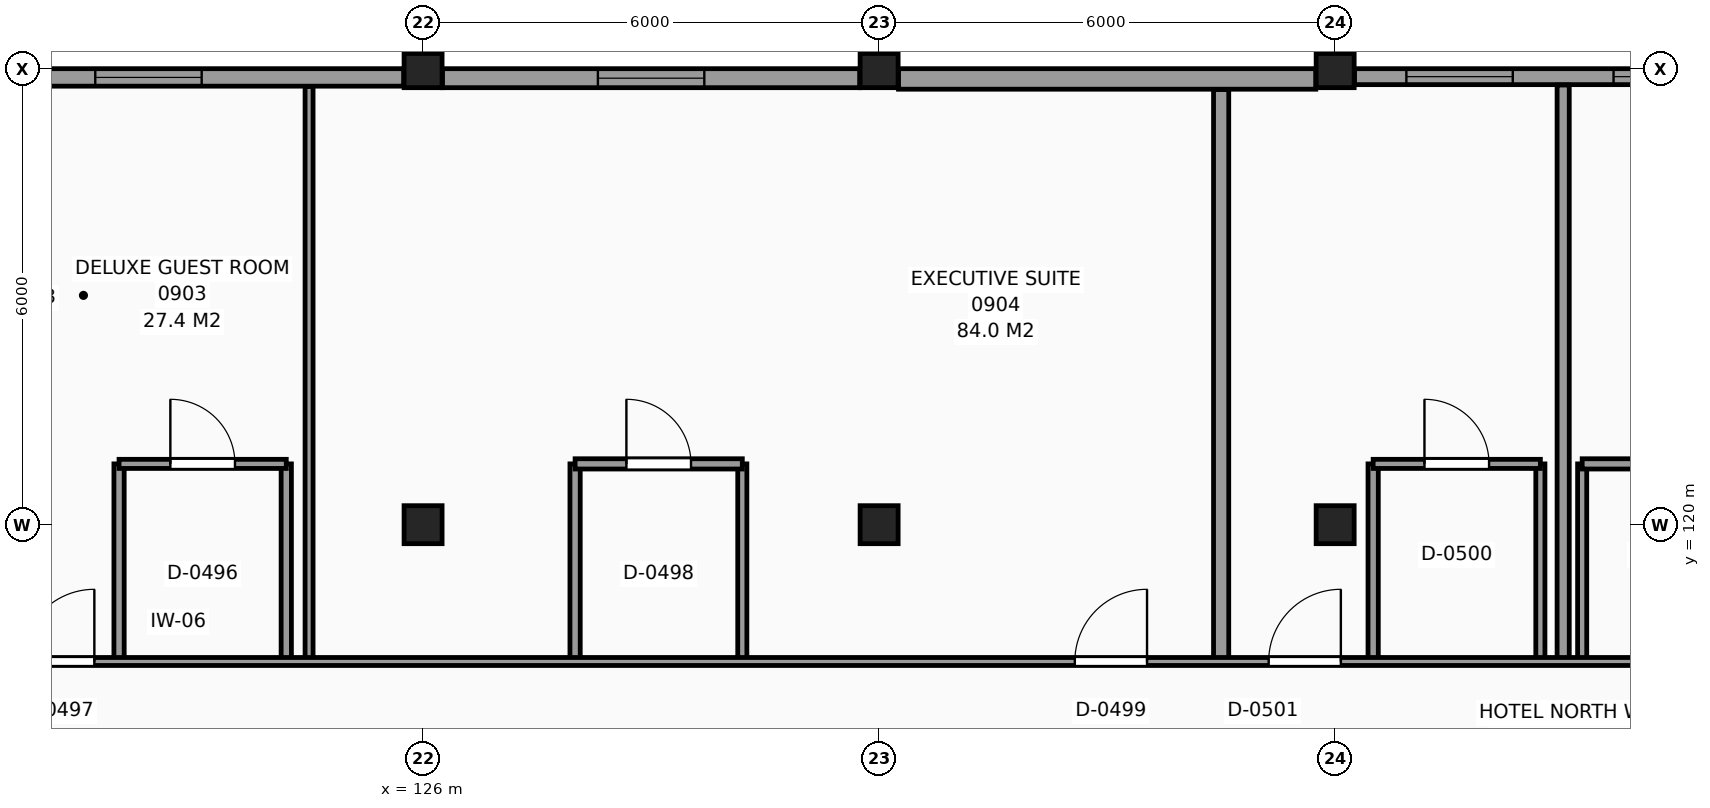
"""IFC4 building model, lengths in metres.
Left out: names, types, materials, properties, quantities, classifications, styles, units other than length and angle.
Written with IfcOpenShell. Run it as: python <this file> out.ifc"""

import sys

from ifc_helpers import new_model, si_unit, direction, frame, frame_2d, origin, origin_2d, place, context, subcontext, project, spatial, rectangle, extrude, element, fill, save


model = new_model("IFC4")
c1 = context("Model", 3, precision=1e-05, world=origin(), true_north=direction((0.0, 1.0)))
c2 = subcontext(c1, "Body", "Model", "MODEL_VIEW")
j1 = project(units=[si_unit("LENGTHUNIT", "METRE"), si_unit("PLANEANGLEUNIT", "RADIAN")], contexts=[c1])
p1 = place(None, origin())
s1 = spatial("IfcSite", under=j1, at=p1, CompositionType="ELEMENT")
p2 = place(p1, origin())
s2 = spatial("IfcBuilding", under=s1, at=p2, CompositionType="ELEMENT")
p3 = place(p2, frame((0.0, 0.0, 38.1)))
s3 = spatial("IfcBuildingStorey", under=s2, at=p3, CompositionType="ELEMENT", Elevation=38.1)
for number, where, z_axis, x_axis in (
    (1, (126.0, 120.0, 0.0), (0.0, 0.0, 1.0), (1.0, 0.0, 0.0)),
    (2, (126.0, 126.0, 0.0), (0.0, 0.0, 1.0), (1.0, 0.0, 0.0)),
    (3, (132.0, 120.0, 0.0), (0.0, 0.0, 1.0), (1.0, 0.0, 0.0)),
    (4, (132.0, 126.0, 0.0), (0.0, 0.0, 1.0), (1.0, 0.0, 0.0)),
    (5, (138.0, 120.0, 0.0), (0.0, 0.0, 1.0), (1.0, 0.0, 0.0)),
    (6, (138.0, 126.0, 0.0), (0.0, 0.0, 1.0), (1.0, 0.0, 0.0)),
):
    element("IfcColumn", number, at=place(p3, frame(where, z_axis=z_axis, x_axis=x_axis)), inside=s3, PredefinedType="COLUMN", context=c2, shape_type="SweptSolid", body=[
        extrude(rectangle(XDim=0.5, YDim=0.5, at=origin_2d()), origin(), (0.0, 0.0, 1.0), 3.3),
    ])
p4 = place(p3, frame((143.745, 125.895, 0.0), z_axis=(0.0, 0.0, 1.0), x_axis=(-1.0, 0.0, 0.0)))
e7 = element("IfcWall", 7, at=p4, inside=s3, PredefinedType="SOLIDWALL", context=c2, shape_type="SweptSolid", body=[
    extrude(rectangle(XDim=5.49, YDim=0.21, at=frame_2d((2.745, 0.0))), origin(), (0.0, 0.0, 1.0), 2.41),
])
p5 = place(p4, frame((3.408, 0.0, 0.8)))
e8 = element("IfcOpeningElement", 8, at=p5, cuts=e7, PredefinedType="OPENING", context=c2, shape_type="SweptSolid", body=[
    extrude(rectangle(XDim=1.4, YDim=1.4, at=frame_2d((0.7, 0.7))), frame((0.0, 0.115, 0.0), z_axis=(0.0, -1.0, 0.0), x_axis=(1.0, 0.0, 0.0)), (0.0, 0.0, 1.0), 0.23),
])
p6 = place(p4, frame((0.682, 0.0, 0.8)))
e9 = element("IfcOpeningElement", 9, at=p6, cuts=e7, PredefinedType="OPENING", context=c2, shape_type="SweptSolid", body=[
    extrude(rectangle(XDim=1.4, YDim=1.4, at=frame_2d((0.7, 0.7))), frame((0.0, 0.115, 0.0), z_axis=(0.0, -1.0, 0.0), x_axis=(1.0, 0.0, 0.0)), (0.0, 0.0, 1.0), 0.23),
])
p7 = place(p3, frame((137.745, 125.865, 0.0), z_axis=(0.0, 0.0, 1.0), x_axis=(-1.0, 0.0, 0.0)))
e10 = element("IfcWall", 10, at=p7, inside=s3, PredefinedType="SOLIDWALL", context=c2, shape_type="SweptSolid", body=[
    extrude(rectangle(XDim=5.49, YDim=0.27, at=frame_2d((2.745, 0.0))), origin(), (0.0, 0.0, 1.0), 2.41),
])
p8 = place(p3, frame((131.745, 125.875, 0.0), z_axis=(0.0, 0.0, 1.0), x_axis=(-1.0, 0.0, 0.0)))
e11 = element("IfcWall", 11, at=p8, inside=s3, PredefinedType="SOLIDWALL", context=c2, shape_type="SweptSolid", body=[
    extrude(rectangle(XDim=5.49, YDim=0.25, at=frame_2d((2.745, 0.0))), origin(), (0.0, 0.0, 1.0), 2.41),
])
p9 = place(p8, frame((2.045, 0.0, 0.8)))
e12 = element("IfcOpeningElement", 12, at=p9, cuts=e11, PredefinedType="OPENING", context=c2, shape_type="SweptSolid", body=[
    extrude(rectangle(XDim=1.4, YDim=1.4, at=frame_2d((0.7, 0.7))), frame((0.0, 0.135, 0.0), z_axis=(0.0, -1.0, 0.0), x_axis=(1.0, 0.0, 0.0)), (0.0, 0.0, 1.0), 0.27),
])
p10 = place(p3, frame((125.745, 125.885, 0.0), z_axis=(0.0, 0.0, 1.0), x_axis=(-1.0, 0.0, 0.0)))
e13 = element("IfcWall", 13, at=p10, inside=s3, PredefinedType="SOLIDWALL", context=c2, shape_type="SweptSolid", body=[
    extrude(rectangle(XDim=5.49, YDim=0.23, at=frame_2d((2.745, 0.0))), origin(), (0.0, 0.0, 1.0), 2.41),
])
p11 = place(p10, frame((2.658, 0.0, 0.8)))
e14 = element("IfcOpeningElement", 14, at=p11, cuts=e13, PredefinedType="OPENING", context=c2, shape_type="SweptSolid", body=[
    extrude(rectangle(XDim=1.4, YDim=1.4, at=frame_2d((0.7, 0.7))), frame((0.0, 0.125, 0.0), z_axis=(0.0, -1.0, 0.0), x_axis=(1.0, 0.0, 0.0)), (0.0, 0.0, 1.0), 0.25),
])
for number, where, z_axis, x_axis in (
    (15, (122.0, 118.2, 0.0), (0.0, 0.0, 1.0), (0.0, 1.0, 0.0)),
    (16, (124.2, 118.2, 0.0), (0.0, 0.0, 1.0), (0.0, 1.0, 0.0)),
):
    element("IfcWall", number, at=place(p3, frame(where, z_axis=z_axis, x_axis=x_axis)), inside=s3, PredefinedType="PARTITIONING", context=c2, shape_type="SweptSolid", body=[
        extrude(rectangle(XDim=2.6, YDim=0.135, at=frame_2d((1.3, 0.0))), origin(), (0.0, 0.0, 1.0), 3.06),
    ])
p12 = place(p3, frame((124.5, 118.2, 0.0), z_axis=(0.0, 0.0, 1.0), x_axis=(0.0, 1.0, 0.0)))
e17 = element("IfcWall", 17, at=p12, inside=s3, PredefinedType="PARTITIONING", context=c2, shape_type="SweptSolid", body=[
    extrude(rectangle(XDim=7.565, YDim=0.105, at=frame_2d((3.782, 0.0))), origin(), (0.0, 0.0, 1.0), 3.06),
])
p13 = place(p3, frame((128.0, 118.2, 0.0), z_axis=(0.0, 0.0, 1.0), x_axis=(0.0, 1.0, 0.0)))
e18 = element("IfcWall", 18, at=p13, inside=s3, PredefinedType="PARTITIONING", context=c2, shape_type="SweptSolid", body=[
    extrude(rectangle(XDim=2.6, YDim=0.135, at=frame_2d((1.3, 0.0))), origin(), (0.0, 0.0, 1.0), 3.06),
])
p14 = place(p3, frame((130.2, 118.2, 0.0), z_axis=(0.0, 0.0, 1.0), x_axis=(0.0, 1.0, 0.0)))
e19 = element("IfcWall", 19, at=p14, inside=s3, PredefinedType="PARTITIONING", context=c2, shape_type="SweptSolid", body=[
    extrude(rectangle(XDim=2.6, YDim=0.12, at=frame_2d((1.3, 0.0))), origin(), (0.0, 0.0, 1.0), 3.06),
])
p15 = place(p3, frame((136.5, 118.2, 0.0), z_axis=(0.0, 0.0, 1.0), x_axis=(0.0, 1.0, 0.0)))
e20 = element("IfcWall", 20, at=p15, inside=s3, PredefinedType="PARTITIONING", context=c2, shape_type="SweptSolid", body=[
    extrude(rectangle(XDim=7.525, YDim=0.2, at=frame_2d((3.763, 0.0))), origin(), (0.0, 0.0, 1.0), 3.06),
])
p16 = place(p3, frame((138.5, 118.2, 0.0), z_axis=(0.0, 0.0, 1.0), x_axis=(0.0, 1.0, 0.0)))
e21 = element("IfcWall", 21, at=p16, inside=s3, PredefinedType="PARTITIONING", context=c2, shape_type="SweptSolid", body=[
    extrude(rectangle(XDim=2.6, YDim=0.135, at=frame_2d((1.3, 0.0))), origin(), (0.0, 0.0, 1.0), 3.06),
])
p17 = place(p3, frame((140.7, 118.2, 0.0), z_axis=(0.0, 0.0, 1.0), x_axis=(0.0, 1.0, 0.0)))
e22 = element("IfcWall", 22, at=p17, inside=s3, PredefinedType="PARTITIONING", context=c2, shape_type="SweptSolid", body=[
    extrude(rectangle(XDim=2.6, YDim=0.12, at=frame_2d((1.3, 0.0))), origin(), (0.0, 0.0, 1.0), 3.06),
])
p18 = place(p3, frame((141.0, 118.2, 0.0), z_axis=(0.0, 0.0, 1.0), x_axis=(0.0, 1.0, 0.0)))
e23 = element("IfcWall", 23, at=p18, inside=s3, PredefinedType="PARTITIONING", context=c2, shape_type="SweptSolid", body=[
    extrude(rectangle(XDim=7.585, YDim=0.16, at=frame_2d((3.792, 0.0))), origin(), (0.0, 0.0, 1.0), 3.06),
])
p19 = place(p3, frame((141.25, 118.2, 0.0), z_axis=(0.0, 0.0, 1.0), x_axis=(0.0, 1.0, 0.0)))
e24 = element("IfcWall", 24, at=p19, inside=s3, PredefinedType="PARTITIONING", context=c2, shape_type="SweptSolid", body=[
    extrude(rectangle(XDim=2.6, YDim=0.12, at=frame_2d((1.3, 0.0))), origin(), (0.0, 0.0, 1.0), 3.06),
])
p20 = place(p3, frame((102.215, 118.2, 0.0), z_axis=(0.0, 0.0, 1.0), x_axis=(1.0, 0.0, 0.0)))
e25 = element("IfcWall", 25, at=p20, inside=s3, PredefinedType="PARTITIONING", context=c2, shape_type="SweptSolid", body=[
    extrude(rectangle(XDim=74.285, YDim=0.105, at=frame_2d((37.143, 0.0))), origin(), (0.0, 0.0, 1.0), 3.06),
])
p21 = place(p20, frame((2.36, 0.0, 0.0)))
e26 = element("IfcOpeningElement", 26, at=p21, cuts=e25, PredefinedType="OPENING", context=c2, shape_type="SweptSolid", body=[
    extrude(rectangle(XDim=0.95, YDim=2.1, at=frame_2d((0.475, 1.05))), frame((0.0, 0.062, 0.0), z_axis=(0.0, -1.0, 0.0), x_axis=(1.0, 0.0, 0.0)), (0.0, 0.0, 1.0), 0.125),
])
p22 = place(p20, frame((9.41, 0.0, 0.0)))
e27 = element("IfcOpeningElement", 27, at=p22, cuts=e25, PredefinedType="OPENING", context=c2, shape_type="SweptSolid", body=[
    extrude(rectangle(XDim=0.95, YDim=2.1, at=frame_2d((0.475, 1.05))), frame((0.0, 0.062, 0.0), z_axis=(0.0, -1.0, 0.0), x_axis=(1.0, 0.0, 0.0)), (0.0, 0.0, 1.0), 0.125),
])
p23 = place(p20, frame((18.51, 0.0, 0.0)))
e28 = element("IfcOpeningElement", 28, at=p23, cuts=e25, PredefinedType="OPENING", context=c2, shape_type="SweptSolid", body=[
    extrude(rectangle(XDim=0.95, YDim=2.1, at=frame_2d((0.475, 1.05))), frame((0.0, 0.062, 0.0), z_axis=(0.0, -1.0, 0.0), x_axis=(1.0, 0.0, 0.0)), (0.0, 0.0, 1.0), 0.125),
])
p24 = place(p20, frame((32.36, 0.0, 0.0)))
e29 = element("IfcOpeningElement", 29, at=p24, cuts=e25, PredefinedType="OPENING", context=c2, shape_type="SweptSolid", body=[
    extrude(rectangle(XDim=0.95, YDim=2.1, at=frame_2d((0.475, 1.05))), frame((0.0, 0.062, 0.0), z_axis=(0.0, -1.0, 0.0), x_axis=(1.0, 0.0, 0.0)), (0.0, 0.0, 1.0), 0.125),
])
p25 = place(p20, frame((34.91, 0.0, 0.0)))
e30 = element("IfcOpeningElement", 30, at=p25, cuts=e25, PredefinedType="OPENING", context=c2, shape_type="SweptSolid", body=[
    extrude(rectangle(XDim=0.95, YDim=2.1, at=frame_2d((0.475, 1.05))), frame((0.0, 0.062, 0.0), z_axis=(0.0, -1.0, 0.0), x_axis=(1.0, 0.0, 0.0)), (0.0, 0.0, 1.0), 0.125),
])
p26 = place(p20, frame((42.11, 0.0, 0.0)))
e31 = element("IfcOpeningElement", 31, at=p26, cuts=e25, PredefinedType="OPENING", context=c2, shape_type="SweptSolid", body=[
    extrude(rectangle(XDim=0.95, YDim=2.1, at=frame_2d((0.475, 1.05))), frame((0.0, 0.062, 0.0), z_axis=(0.0, -1.0, 0.0), x_axis=(1.0, 0.0, 0.0)), (0.0, 0.0, 1.0), 0.125),
])
p27 = place(p20, frame((50.36, 0.0, 0.0)))
e32 = element("IfcOpeningElement", 32, at=p27, cuts=e25, PredefinedType="OPENING", context=c2, shape_type="SweptSolid", body=[
    extrude(rectangle(XDim=0.95, YDim=2.1, at=frame_2d((0.475, 1.05))), frame((0.0, 0.062, 0.0), z_axis=(0.0, -1.0, 0.0), x_axis=(1.0, 0.0, 0.0)), (0.0, 0.0, 1.0), 0.125),
])
p28 = place(p20, frame((52.91, 0.0, 0.0)))
e33 = element("IfcOpeningElement", 33, at=p28, cuts=e25, PredefinedType="OPENING", context=c2, shape_type="SweptSolid", body=[
    extrude(rectangle(XDim=0.95, YDim=2.1, at=frame_2d((0.475, 1.05))), frame((0.0, 0.062, 0.0), z_axis=(0.0, -1.0, 0.0), x_axis=(1.0, 0.0, 0.0)), (0.0, 0.0, 1.0), 0.125),
])
p29 = place(p20, frame((60.11, 0.0, 0.0)))
e34 = element("IfcOpeningElement", 34, at=p29, cuts=e25, PredefinedType="OPENING", context=c2, shape_type="SweptSolid", body=[
    extrude(rectangle(XDim=0.95, YDim=2.1, at=frame_2d((0.475, 1.05))), frame((0.0, 0.062, 0.0), z_axis=(0.0, -1.0, 0.0), x_axis=(1.0, 0.0, 0.0)), (0.0, 0.0, 1.0), 0.125),
])
p30 = place(p20, frame((64.31, 0.0, 0.0)))
e35 = element("IfcOpeningElement", 35, at=p30, cuts=e25, PredefinedType="OPENING", context=c2, shape_type="SweptSolid", body=[
    extrude(rectangle(XDim=0.95, YDim=2.1, at=frame_2d((0.475, 1.05))), frame((0.0, 0.062, 0.0), z_axis=(0.0, -1.0, 0.0), x_axis=(1.0, 0.0, 0.0)), (0.0, 0.0, 1.0), 0.125),
])
p31 = place(p20, frame((68.26, 0.0, 0.0)))
e36 = element("IfcOpeningElement", 36, at=p31, cuts=e25, PredefinedType="OPENING", context=c2, shape_type="SweptSolid", body=[
    extrude(rectangle(XDim=0.95, YDim=2.1, at=frame_2d((0.475, 1.05))), frame((0.0, 0.062, 0.0), z_axis=(0.0, -1.0, 0.0), x_axis=(1.0, 0.0, 0.0)), (0.0, 0.0, 1.0), 0.125),
])
p32 = place(p3, frame((122.0, 120.8, 0.0), z_axis=(0.0, 0.0, 1.0), x_axis=(1.0, 0.0, 0.0)))
e37 = element("IfcWall", 37, at=p32, inside=s3, PredefinedType="PARTITIONING", context=c2, shape_type="SweptSolid", body=[
    extrude(rectangle(XDim=2.2, YDim=0.12, at=frame_2d((1.1, 0.0))), origin(), (0.0, 0.0, 1.0), 3.06),
])
p33 = place(p32, frame((0.675, 0.0, 0.0)))
e38 = element("IfcOpeningElement", 38, at=p33, cuts=e37, PredefinedType="OPENING", context=c2, shape_type="SweptSolid", body=[
    extrude(rectangle(XDim=0.85, YDim=2.1, at=frame_2d((0.425, 1.05))), frame((0.0, 0.07, 0.0), z_axis=(0.0, -1.0, 0.0), x_axis=(1.0, 0.0, 0.0)), (0.0, 0.0, 1.0), 0.14),
])
p34 = place(p3, frame((128.0, 120.8, 0.0), z_axis=(0.0, 0.0, 1.0), x_axis=(1.0, 0.0, 0.0)))
e39 = element("IfcWall", 39, at=p34, inside=s3, PredefinedType="PARTITIONING", context=c2, shape_type="SweptSolid", body=[
    extrude(rectangle(XDim=2.2, YDim=0.135, at=frame_2d((1.1, 0.0))), origin(), (0.0, 0.0, 1.0), 3.06),
])
p35 = place(p34, frame((0.675, 0.0, 0.0)))
e40 = element("IfcOpeningElement", 40, at=p35, cuts=e39, PredefinedType="OPENING", context=c2, shape_type="SweptSolid", body=[
    extrude(rectangle(XDim=0.85, YDim=2.1, at=frame_2d((0.425, 1.05))), frame((0.0, 0.078, 0.0), z_axis=(0.0, -1.0, 0.0), x_axis=(1.0, 0.0, 0.0)), (0.0, 0.0, 1.0), 0.155),
])
p36 = place(p3, frame((138.5, 120.8, 0.0), z_axis=(0.0, 0.0, 1.0), x_axis=(1.0, 0.0, 0.0)))
e41 = element("IfcWall", 41, at=p36, inside=s3, PredefinedType="PARTITIONING", context=c2, shape_type="SweptSolid", body=[
    extrude(rectangle(XDim=2.2, YDim=0.12, at=frame_2d((1.1, 0.0))), origin(), (0.0, 0.0, 1.0), 3.06),
])
p37 = place(p36, frame((0.675, 0.0, 0.0)))
e42 = element("IfcOpeningElement", 42, at=p37, cuts=e41, PredefinedType="OPENING", context=c2, shape_type="SweptSolid", body=[
    extrude(rectangle(XDim=0.85, YDim=2.1, at=frame_2d((0.425, 1.05))), frame((0.0, 0.07, 0.0), z_axis=(0.0, -1.0, 0.0), x_axis=(1.0, 0.0, 0.0)), (0.0, 0.0, 1.0), 0.14),
])
p38 = place(p3, frame((141.25, 120.8, 0.0), z_axis=(0.0, 0.0, 1.0), x_axis=(1.0, 0.0, 0.0)))
e43 = element("IfcWall", 43, at=p38, inside=s3, PredefinedType="PARTITIONING", context=c2, shape_type="SweptSolid", body=[
    extrude(rectangle(XDim=2.2, YDim=0.135, at=frame_2d((1.1, 0.0))), origin(), (0.0, 0.0, 1.0), 3.06),
])
p39 = place(p38, frame((0.675, 0.0, 0.0)))
e44 = element("IfcOpeningElement", 44, at=p39, cuts=e43, PredefinedType="OPENING", context=c2, shape_type="SweptSolid", body=[
    extrude(rectangle(XDim=0.85, YDim=2.1, at=frame_2d((0.425, 1.05))), frame((0.0, 0.078, 0.0), z_axis=(0.0, -1.0, 0.0), x_axis=(1.0, 0.0, 0.0)), (0.0, 0.0, 1.0), 0.155),
])
p40 = place(p11, origin())
e45 = element("IfcWindow", 45, at=p40, inside=s3, PartitioningType="SINGLE_PANEL", PredefinedType="WINDOW", context=c2, shape_type="SweptSolid", body=[
    extrude(rectangle(XDim=1.4, YDim=1.4, at=frame_2d((0.7, 0.7))), frame((0.0, 0.03, 0.0), z_axis=(0.0, -1.0, 0.0), x_axis=(1.0, 0.0, 0.0)), (0.0, 0.0, 1.0), 0.06),
])
fill(e14, e45)
p41 = place(p9, origin())
e46 = element("IfcWindow", 46, at=p41, inside=s3, PartitioningType="SINGLE_PANEL", PredefinedType="WINDOW", context=c2, shape_type="SweptSolid", body=[
    extrude(rectangle(XDim=1.4, YDim=1.4, at=frame_2d((0.7, 0.7))), frame((0.0, 0.03, 0.0), z_axis=(0.0, -1.0, 0.0), x_axis=(1.0, 0.0, 0.0)), (0.0, 0.0, 1.0), 0.06),
])
fill(e12, e46)
p42 = place(p5, origin())
e47 = element("IfcWindow", 47, at=p42, inside=s3, PartitioningType="SINGLE_PANEL", PredefinedType="WINDOW", context=c2, shape_type="SweptSolid", body=[
    extrude(rectangle(XDim=1.4, YDim=1.4, at=frame_2d((0.7, 0.7))), frame((0.0, 0.03, 0.0), z_axis=(0.0, -1.0, 0.0), x_axis=(1.0, 0.0, 0.0)), (0.0, 0.0, 1.0), 0.06),
])
fill(e8, e47)
p43 = place(p6, origin())
e48 = element("IfcWindow", 48, at=p43, inside=s3, PartitioningType="SINGLE_PANEL", PredefinedType="WINDOW", context=c2, shape_type="SweptSolid", body=[
    extrude(rectangle(XDim=1.4, YDim=1.4, at=frame_2d((0.7, 0.7))), frame((0.0, 0.03, 0.0), z_axis=(0.0, -1.0, 0.0), x_axis=(1.0, 0.0, 0.0)), (0.0, 0.0, 1.0), 0.06),
])
fill(e9, e48)
p44 = place(p33, origin())
e49 = element("IfcDoor", 49, at=p44, inside=s3, OperationType="SINGLE_SWING_LEFT", PredefinedType="DOOR", context=c2, shape_type="SweptSolid", body=[
    extrude(rectangle(XDim=0.85, YDim=2.1, at=frame_2d((0.425, 1.05))), frame((0.0, 0.025, 0.0), z_axis=(0.0, -1.0, 0.0), x_axis=(1.0, 0.0, 0.0)), (0.0, 0.0, 1.0), 0.05),
])
fill(e38, e49)
p45 = place(p23, origin())
e50 = element("IfcDoor", 50, at=p45, inside=s3, OperationType="SINGLE_SWING_RIGHT", PredefinedType="DOOR", context=c2, shape_type="SweptSolid", body=[
    extrude(rectangle(XDim=0.95, YDim=2.1, at=frame_2d((0.475, 1.05))), frame((0.0, 0.025, 0.0), z_axis=(0.0, -1.0, 0.0), x_axis=(1.0, 0.0, 0.0)), (0.0, 0.0, 1.0), 0.05),
])
fill(e28, e50)
p46 = place(p35, origin())
e51 = element("IfcDoor", 51, at=p46, inside=s3, OperationType="SINGLE_SWING_LEFT", PredefinedType="DOOR", context=c2, shape_type="SweptSolid", body=[
    extrude(rectangle(XDim=0.85, YDim=2.1, at=frame_2d((0.425, 1.05))), frame((0.0, 0.025, 0.0), z_axis=(0.0, -1.0, 0.0), x_axis=(1.0, 0.0, 0.0)), (0.0, 0.0, 1.0), 0.05),
])
fill(e40, e51)
p47 = place(p24, origin())
e52 = element("IfcDoor", 52, at=p47, inside=s3, OperationType="SINGLE_SWING_RIGHT", PredefinedType="DOOR", context=c2, shape_type="SweptSolid", body=[
    extrude(rectangle(XDim=0.95, YDim=2.1, at=frame_2d((0.475, 1.05))), frame((0.0, 0.025, 0.0), z_axis=(0.0, -1.0, 0.0), x_axis=(1.0, 0.0, 0.0)), (0.0, 0.0, 1.0), 0.05),
])
fill(e29, e52)
p48 = place(p37, origin())
e53 = element("IfcDoor", 53, at=p48, inside=s3, OperationType="SINGLE_SWING_LEFT", PredefinedType="DOOR", context=c2, shape_type="SweptSolid", body=[
    extrude(rectangle(XDim=0.85, YDim=2.1, at=frame_2d((0.425, 1.05))), frame((0.0, 0.025, 0.0), z_axis=(0.0, -1.0, 0.0), x_axis=(1.0, 0.0, 0.0)), (0.0, 0.0, 1.0), 0.05),
])
fill(e42, e53)
p49 = place(p25, origin())
e54 = element("IfcDoor", 54, at=p49, inside=s3, OperationType="SINGLE_SWING_RIGHT", PredefinedType="DOOR", context=c2, shape_type="SweptSolid", body=[
    extrude(rectangle(XDim=0.95, YDim=2.1, at=frame_2d((0.475, 1.05))), frame((0.0, 0.025, 0.0), z_axis=(0.0, -1.0, 0.0), x_axis=(1.0, 0.0, 0.0)), (0.0, 0.0, 1.0), 0.05),
])
fill(e30, e54)
save(model, sys.argv[1])
